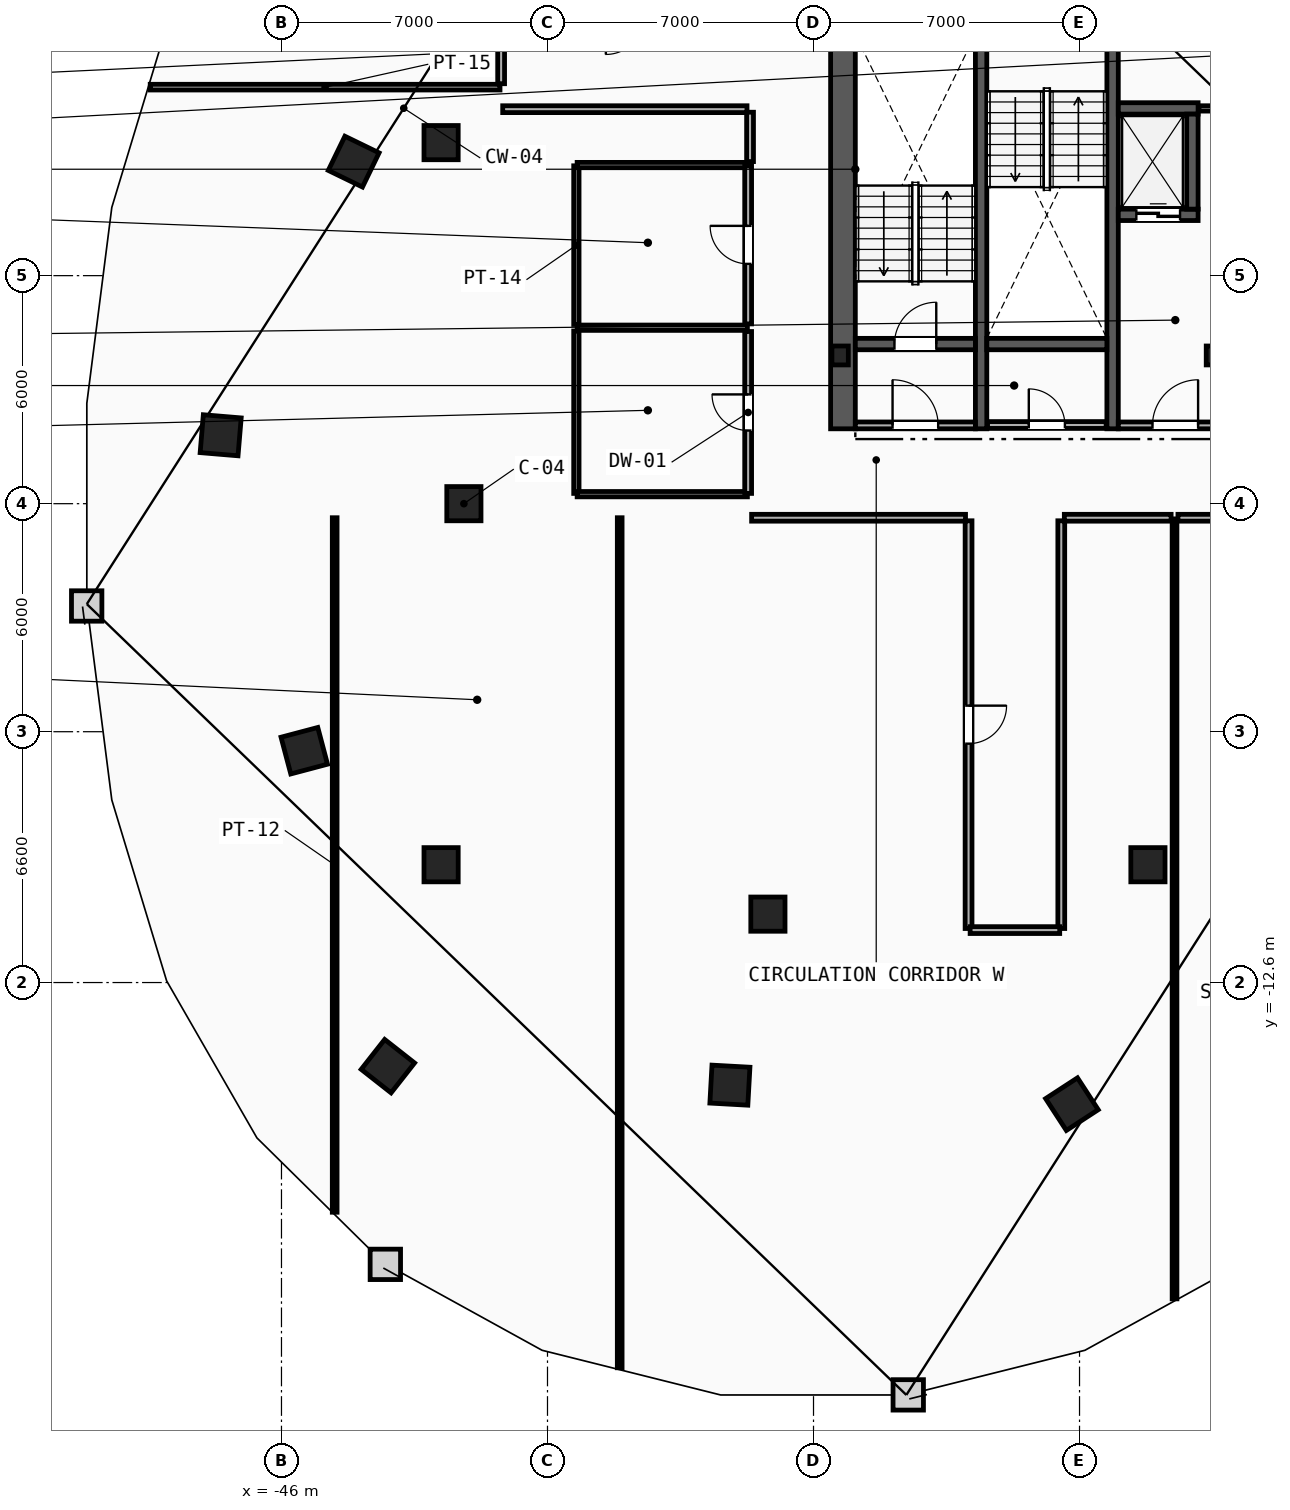
"""IFC4 building model, lengths in metres.
Left out: names, types, materials, properties, quantities, classifications, styles, units other than length and angle.
Written with IfcOpenShell. Run it as: python <this file> out.ifc"""

import sys

from ifc_helpers import new_model, si_unit, direction, frame, frame_2d, origin, origin_2d, place, context, subcontext, project, spatial, rectangle, i_section, extrude, element, fill, save


model = new_model("IFC4")
c1 = context("Model", 3, precision=1e-05, world=origin(), true_north=direction((0.0, 1.0)))
c2 = subcontext(c1, "Body", "Model", "MODEL_VIEW")
j1 = project(units=[si_unit("LENGTHUNIT", "METRE"), si_unit("PLANEANGLEUNIT", "RADIAN")], contexts=[c1])
p1 = place(None, origin())
s1 = spatial("IfcSite", under=j1, at=p1, CompositionType="ELEMENT")
p2 = place(p1, origin())
s2 = spatial("IfcBuilding", under=s1, at=p2, CompositionType="ELEMENT")
p3 = place(p2, frame((0.0, 0.0, 140.4)))
s3 = spatial("IfcBuildingStorey", under=s2, at=p3, CompositionType="ELEMENT", Elevation=140.4)
for number, where, z_axis, x_axis in (
    (1, (-31.3, 3.9, 0.0), (0.0, 0.0, 1.0), (1.0, 0.0, 0.0)),
    (2, (-21.45, 3.9, 0.0), (0.0, 0.0, 1.0), (1.0, 0.0, 0.0)),
):
    element("IfcColumn", number, at=place(p3, frame(where, z_axis=z_axis, x_axis=x_axis)), inside=s3, PredefinedType="COLUMN", context=c2, shape_type="SweptSolid", body=[
        extrude(i_section(OverallWidth=0.432, OverallDepth=0.498, WebThickness=0.056, FlangeThickness=0.089, FilletRadius=0.018, at=origin_2d()), origin(), (0.0, 0.0, 1.0), 3.6),
    ])
for number, where, z_axis, x_axis in (
    (3, (-41.2, 0.0, 0.0), (0.0, 0.0, 1.0), (1.0, 0.0, 0.0)),
    (4, (-41.8, 9.5, 0.0), (0.0, 0.0, 1.0), (1.0, 0.0, 0.0)),
    (5, (-41.8, -9.5, 0.0), (0.0, 0.0, 1.0), (1.0, 0.0, 0.0)),
    (6, (-33.2, -10.8, 0.0), (0.0, 0.0, 1.0), (1.0, 0.0, 0.0)),
    (7, (-23.2, -9.5, 0.0), (0.0, 0.0, 1.0), (1.0, 0.0, 0.0)),
):
    element("IfcColumn", number, at=place(p3, frame(where, z_axis=z_axis, x_axis=x_axis)), inside=s3, PredefinedType="COLUMN", context=c2, shape_type="SweptSolid", body=[
        extrude(rectangle(XDim=0.9, YDim=0.9, at=origin_2d()), origin(), (0.0, 0.0, 1.0), 3.6),
    ])
for number, where, z_axis, x_axis in (
    (8, (-44.1, 9.0, 0.0), (0.0, 0.0, 1.0), (-0.437, -0.899, 0.0)),
    (9, (-47.6, 1.8, 0.0), (0.0, 0.0, 1.0), (-0.084, -0.997, 0.0)),
    (10, (-45.4, -6.5, 0.0), (0.0, 0.0, 1.0), (0.256, -0.967, 0.0)),
    (11, (-43.2, -14.8, 0.0), (0.0, 0.0, 1.0), (0.786, -0.618, 0.0)),
    (12, (-34.2, -15.3, 0.0), (0.0, 0.0, 1.0), (0.998, -0.055, 0.0)),
    (13, (-25.2, -15.8, 0.0), (0.0, 0.0, 1.0), (0.838, 0.546, 0.0)),
):
    element("IfcColumn", number, at=place(p3, frame(where, z_axis=z_axis, x_axis=x_axis)), inside=s3, PredefinedType="COLUMN", context=c2, shape_type="SweptSolid", body=[
        extrude(rectangle(XDim=1.0, YDim=1.0, at=origin_2d()), origin(), (0.0, 0.0, 1.0), 3.6),
    ])
p4 = place(p3, frame((-31.225, 1.97, 0.0), z_axis=(0.0, 0.0, 1.0), x_axis=(0.0, 1.0, 0.0)))
e14 = element("IfcWall", 14, at=p4, inside=s3, PredefinedType="SHEAR", context=c2, shape_type="SweptSolid", body=[
    extrude(rectangle(XDim=13.33, YDim=0.65, at=frame_2d((6.665, 0.0))), origin(), (0.0, 0.0, 1.0), 3.36),
])
for number, where, z_axis, x_axis in (
    (15, (-27.59, 1.97, 0.0), (0.0, 0.0, 1.0), (0.0, 1.0, 0.0)),
    (16, (-24.13, 1.97, 0.0), (0.0, 0.0, 1.0), (0.0, 1.0, 0.0)),
):
    element("IfcWall", number, at=place(p3, frame(where, z_axis=z_axis, x_axis=x_axis)), inside=s3, PredefinedType="SHEAR", context=c2, shape_type="SweptSolid", body=[
        extrude(rectangle(XDim=10.68, YDim=0.3, at=frame_2d((5.34, 0.0))), origin(), (0.0, 0.0, 1.0), 3.36),
    ])
p5 = place(p3, frame((-30.9, 4.2, 0.0), z_axis=(0.0, 0.0, 1.0), x_axis=(1.0, 0.0, 0.0)))
e17 = element("IfcWall", 17, at=p5, inside=s3, PredefinedType="SHEAR", context=c2, shape_type="SweptSolid", body=[
    extrude(rectangle(XDim=3.16, YDim=0.3, at=frame_2d((1.58, 0.0))), origin(), (0.0, 0.0, 1.0), 3.36),
])
p6 = place(p5, frame((1.03, 0.0, 0.0)))
e18 = element("IfcOpeningElement", 18, at=p6, cuts=e17, PredefinedType="OPENING", context=c2, shape_type="SweptSolid", body=[
    extrude(rectangle(XDim=1.1, YDim=2.15, at=frame_2d((0.55, 1.075))), frame((0.0, 0.16, 0.0), z_axis=(0.0, -1.0, 0.0), x_axis=(1.0, 0.0, 0.0)), (0.0, 0.0, 1.0), 0.32),
])
p7 = place(p3, frame((-27.44, 4.2, 0.0), z_axis=(0.0, 0.0, 1.0), x_axis=(1.0, 0.0, 0.0)))
e19 = element("IfcWall", 19, at=p7, inside=s3, PredefinedType="SHEAR", context=c2, shape_type="SweptSolid", body=[
    extrude(rectangle(XDim=3.16, YDim=0.3, at=frame_2d((1.58, 0.0))), origin(), (0.0, 0.0, 1.0), 3.36),
])
p8 = place(p3, frame((-23.98, 2.06, 0.0), z_axis=(0.0, 0.0, 1.0), x_axis=(1.0, 0.0, 0.0)))
e20 = element("IfcWall", 20, at=p8, inside=s3, PredefinedType="PARTITIONING", context=c2, shape_type="SweptSolid", body=[
    extrude(rectangle(XDim=3.0, YDim=0.18, at=frame_2d((1.5, 0.0))), origin(), (0.0, 0.0, 1.0), 3.36),
])
p9 = place(p8, frame((0.9, 0.0, 0.0)))
e21 = element("IfcOpeningElement", 21, at=p9, cuts=e20, PredefinedType="OPENING", context=c2, shape_type="SweptSolid", body=[
    extrude(rectangle(XDim=1.2, YDim=2.15, at=frame_2d((0.6, 1.075))), frame((0.0, 0.1, 0.0), z_axis=(0.0, -1.0, 0.0), x_axis=(1.0, 0.0, 0.0)), (0.0, 0.0, 1.0), 0.2),
])
p10 = place(p3, frame((-30.9, 2.06, 0.0), z_axis=(0.0, 0.0, 1.0), x_axis=(1.0, 0.0, 0.0)))
e22 = element("IfcWall", 22, at=p10, inside=s3, PredefinedType="PARTITIONING", context=c2, shape_type="SweptSolid", body=[
    extrude(rectangle(XDim=3.16, YDim=0.18, at=frame_2d((1.58, 0.0))), origin(), (0.0, 0.0, 1.0), 3.36),
])
p11 = place(p10, frame((0.98, 0.0, 0.0)))
e23 = element("IfcOpeningElement", 23, at=p11, cuts=e22, PredefinedType="OPENING", context=c2, shape_type="SweptSolid", body=[
    extrude(rectangle(XDim=1.2, YDim=2.15, at=frame_2d((0.6, 1.075))), frame((0.0, 0.1, 0.0), z_axis=(0.0, -1.0, 0.0), x_axis=(1.0, 0.0, 0.0)), (0.0, 0.0, 1.0), 0.2),
])
p12 = place(p3, frame((-23.98, 7.6, 0.0), z_axis=(0.0, 0.0, 1.0), x_axis=(1.0, 0.0, 0.0)))
e24 = element("IfcWall", 24, at=p12, inside=s3, PredefinedType="SHEAR", context=c2, shape_type="SweptSolid", body=[
    extrude(rectangle(XDim=2.1, YDim=0.3, at=frame_2d((1.05, 0.0))), origin(), (0.0, 0.0, 1.0), 3.36),
])
p13 = place(p12, frame((0.475, 0.0, 0.0)))
e25 = element("IfcOpeningElement", 25, at=p13, cuts=e24, PredefinedType="OPENING", context=c2, shape_type="SweptSolid", body=[
    extrude(rectangle(XDim=1.15, YDim=2.2, at=frame_2d((0.575, 1.1))), frame((0.0, 0.16, 0.0), z_axis=(0.0, -1.0, 0.0), x_axis=(1.0, 0.0, 0.0)), (0.0, 0.0, 1.0), 0.32),
])
p14 = place(p3, frame((-23.98, 10.4, 0.0), z_axis=(0.0, 0.0, 1.0), x_axis=(1.0, 0.0, 0.0)))
e26 = element("IfcWall", 26, at=p14, inside=s3, PredefinedType="SHEAR", context=c2, shape_type="SweptSolid", body=[
    extrude(rectangle(XDim=2.1, YDim=0.3, at=frame_2d((1.05, 0.0))), origin(), (0.0, 0.0, 1.0), 3.36),
])
p15 = place(p3, frame((-22.03, 7.75, 0.0), z_axis=(0.0, 0.0, 1.0), x_axis=(0.0, 1.0, 0.0)))
e27 = element("IfcWall", 27, at=p15, inside=s3, PredefinedType="SHEAR", context=c2, shape_type="SweptSolid", body=[
    extrude(rectangle(XDim=2.5, YDim=0.3, at=frame_2d((1.25, 0.0))), origin(), (0.0, 0.0, 1.0), 3.36),
])
p16 = place(p3, frame((-21.86, 10.4, 0.0), z_axis=(0.0, 0.0, 1.0), x_axis=(1.0, 0.0, 0.0)))
e28 = element("IfcWall", 28, at=p16, inside=s3, PredefinedType="PARTITIONING", context=c2, shape_type="SweptSolid", body=[
    extrude(rectangle(XDim=0.59, YDim=0.14, at=frame_2d((0.295, 0.0))), origin(), (0.0, 0.0, 1.0), 3.36),
])
p17 = place(p3, frame((-27.42, 2.07, 0.0), z_axis=(0.0, 0.0, 1.0), x_axis=(1.0, 0.0, 0.0)))
e29 = element("IfcWall", 29, at=p17, inside=s3, PredefinedType="PARTITIONING", context=c2, shape_type="SweptSolid", body=[
    extrude(rectangle(XDim=3.12, YDim=0.18, at=frame_2d((1.56, 0.0))), origin(), (0.0, 0.0, 1.0), 3.36),
])
p18 = place(p17, frame((1.085, 0.0, 0.0)))
e30 = element("IfcOpeningElement", 30, at=p18, cuts=e29, PredefinedType="OPENING", context=c2, shape_type="SweptSolid", body=[
    extrude(rectangle(XDim=0.95, YDim=2.1, at=frame_2d((0.475, 1.05))), frame((0.0, 0.1, 0.0), z_axis=(0.0, -1.0, 0.0), x_axis=(1.0, 0.0, 0.0)), (0.0, 0.0, 1.0), 0.2),
])
p19 = place(p3, frame((-38.24, 0.27, 0.0), z_axis=(0.0, 0.0, 1.0), x_axis=(0.0, 1.0, 0.0)))
e31 = element("IfcWall", 31, at=p19, inside=s3, PredefinedType="PARTITIONING", context=c2, shape_type="SweptSolid", body=[
    extrude(rectangle(XDim=4.275, YDim=0.14, at=frame_2d((2.137, 0.0))), origin(), (0.0, 0.0, 1.0), 3.36),
])
p20 = place(p3, frame((-38.24, 4.715, 0.0), z_axis=(0.0, 0.0, 1.0), x_axis=(0.0, 1.0, 0.0)))
e32 = element("IfcWall", 32, at=p20, inside=s3, PredefinedType="PARTITIONING", context=c2, shape_type="SweptSolid", body=[
    extrude(rectangle(XDim=4.175, YDim=0.14, at=frame_2d((2.087, 0.0))), origin(), (0.0, 0.0, 1.0), 3.36),
])
for number, where, z_axis, x_axis in (
    (33, (-38.22, 0.25, 0.0), (0.0, 0.0, 1.0), (1.0, 0.0, 0.0)),
    (34, (-38.22, 4.63, 0.0), (0.0, 0.0, 1.0), (1.0, 0.0, 0.0)),
    (35, (-38.22, 8.91, 0.0), (0.0, 0.0, 1.0), (1.0, 0.0, 0.0)),
):
    element("IfcWall", number, at=place(p3, frame(where, z_axis=z_axis, x_axis=x_axis)), inside=s3, PredefinedType="PARTITIONING", context=c2, shape_type="SweptSolid", body=[
        extrude(rectangle(XDim=4.48, YDim=0.14, at=frame_2d((2.24, 0.0))), origin(), (0.0, 0.0, 1.0), 3.36),
    ])
p21 = place(p3, frame((-33.72, 0.27, 0.0), z_axis=(0.0, 0.0, 1.0), x_axis=(0.0, 1.0, 0.0)))
e36 = element("IfcWall", 36, at=p21, inside=s3, PredefinedType="PARTITIONING", context=c2, shape_type="SweptSolid", body=[
    extrude(rectangle(XDim=4.26, YDim=0.18, at=frame_2d((2.13, 0.0))), origin(), (0.0, 0.0, 1.0), 3.36),
])
p22 = place(p21, frame((1.655, 0.0, 0.0)))
e37 = element("IfcOpeningElement", 37, at=p22, cuts=e36, PredefinedType="OPENING", context=c2, shape_type="SweptSolid", body=[
    extrude(rectangle(XDim=0.95, YDim=2.1, at=frame_2d((0.475, 1.05))), frame((0.0, 0.1, 0.0), z_axis=(0.0, -1.0, 0.0), x_axis=(1.0, 0.0, 0.0)), (0.0, 0.0, 1.0), 0.2),
])
p23 = place(p3, frame((-33.72, 4.73, 0.0), z_axis=(0.0, 0.0, 1.0), x_axis=(0.0, 1.0, 0.0)))
e38 = element("IfcWall", 38, at=p23, inside=s3, PredefinedType="PARTITIONING", context=c2, shape_type="SweptSolid", body=[
    extrude(rectangle(XDim=4.16, YDim=0.18, at=frame_2d((2.08, 0.0))), origin(), (0.0, 0.0, 1.0), 3.36),
])
p24 = place(p23, frame((1.58, 0.0, 0.0)))
e39 = element("IfcOpeningElement", 39, at=p24, cuts=e38, PredefinedType="OPENING", context=c2, shape_type="SweptSolid", body=[
    extrude(rectangle(XDim=1.0, YDim=2.15, at=frame_2d((0.5, 1.075))), frame((0.0, 0.1, 0.0), z_axis=(0.0, -1.0, 0.0), x_axis=(1.0, 0.0, 0.0)), (0.0, 0.0, 1.0), 0.2),
])
p25 = place(p3, frame((-44.6, -18.644, 0.0), z_axis=(0.0, 0.0, 1.0), x_axis=(0.0, 1.0, 0.0)))
e40 = element("IfcWall", 40, at=p25, inside=s3, PredefinedType="PARTITIONING", context=c2, shape_type="SweptSolid", body=[
    extrude(rectangle(XDim=18.274, YDim=0.125, at=frame_2d((9.137, 0.0))), origin(), (0.0, 0.0, 1.0), 2.665),
])
p26 = place(p3, frame((-37.1, -22.736, 0.0), z_axis=(0.0, 0.0, 1.0), x_axis=(0.0, 1.0, 0.0)))
e41 = element("IfcWall", 41, at=p26, inside=s3, PredefinedType="PARTITIONING", context=c2, shape_type="SweptSolid", body=[
    extrude(rectangle(XDim=22.366, YDim=0.125, at=frame_2d((11.183, 0.0))), origin(), (0.0, 0.0, 1.0), 3.36),
])
p27 = place(p3, frame((-22.5, -20.923, 0.0), z_axis=(0.0, 0.0, 1.0), x_axis=(0.0, 1.0, 0.0)))
e42 = element("IfcWall", 42, at=p27, inside=s3, PredefinedType="PARTITIONING", context=c2, shape_type="SweptSolid", body=[
    extrude(rectangle(XDim=20.523, YDim=0.125, at=frame_2d((10.262, 0.0))), origin(), (0.0, 0.0, 1.0), 2.665),
])
p28 = place(p3, frame((-49.454, 10.96, 0.0), z_axis=(0.0, 0.0, 1.0), x_axis=(1.0, 0.0, 0.0)))
e43 = element("IfcWall", 43, at=p28, inside=s3, PredefinedType="PARTITIONING", context=c2, shape_type="SweptSolid", body=[
    extrude(rectangle(XDim=9.204, YDim=0.15, at=frame_2d((4.602, 0.0))), origin(), (0.0, 0.0, 1.0), 3.36),
])
p29 = place(p3, frame((-27.92, -0.45, 0.0), z_axis=(0.0, 0.0, 1.0), x_axis=(0.0, -1.0, 0.0)))
e44 = element("IfcWall", 44, at=p29, inside=s3, PredefinedType="PARTITIONING", context=c2, shape_type="SweptSolid", body=[
    extrude(rectangle(XDim=10.729, YDim=0.18, at=frame_2d((5.364, 0.0))), origin(), (0.0, 0.0, 1.0), 3.36),
])
p30 = place(p29, frame((4.864, 0.0, 0.0)))
e45 = element("IfcOpeningElement", 45, at=p30, cuts=e44, PredefinedType="OPENING", context=c2, shape_type="SweptSolid", body=[
    extrude(rectangle(XDim=1.0, YDim=2.15, at=frame_2d((0.5, 1.075))), frame((0.0, 0.1, 0.0), z_axis=(0.0, -1.0, 0.0), x_axis=(1.0, 0.0, 0.0)), (0.0, 0.0, 1.0), 0.2),
])
p31 = place(p3, frame((-25.48, -11.178, 0.0), z_axis=(0.0, 0.0, 1.0), x_axis=(0.0, 1.0, 0.0)))
e46 = element("IfcWall", 46, at=p31, inside=s3, PredefinedType="PARTITIONING", context=c2, shape_type="SweptSolid", body=[
    extrude(rectangle(XDim=10.729, YDim=0.18, at=frame_2d((5.364, 0.0))), origin(), (0.0, 0.0, 1.0), 3.36),
])
p32 = place(p3, frame((-40.178, 10.38, 0.0), z_axis=(0.0, 0.0, 1.0), x_axis=(1.0, 0.0, 0.0)))
e47 = element("IfcWall", 47, at=p32, inside=s3, PredefinedType="PARTITIONING", context=c2, shape_type="SweptSolid", body=[
    extrude(rectangle(XDim=6.428, YDim=0.18, at=frame_2d((3.214, 0.0))), origin(), (0.0, 0.0, 1.0), 3.36),
])
p33 = place(p3, frame((-33.628, -0.37, 0.0), z_axis=(0.0, 0.0, 1.0), x_axis=(1.0, 0.0, 0.0)))
e48 = element("IfcWall", 48, at=p33, inside=s3, PredefinedType="PARTITIONING", context=c2, shape_type="SweptSolid", body=[
    extrude(rectangle(XDim=5.628, YDim=0.18, at=frame_2d((2.814, 0.0))), origin(), (0.0, 0.0, 1.0), 3.36),
])
p34 = place(p3, frame((-25.4, -0.37, 0.0), z_axis=(0.0, 0.0, 1.0), x_axis=(1.0, 0.0, 0.0)))
e49 = element("IfcWall", 49, at=p34, inside=s3, PredefinedType="PARTITIONING", context=c2, shape_type="SweptSolid", body=[
    extrude(rectangle(XDim=2.81, YDim=0.18, at=frame_2d((1.405, 0.0))), origin(), (0.0, 0.0, 1.0), 3.36),
])
p35 = place(p3, frame((-27.878, -11.22, 0.0), z_axis=(0.0, 0.0, 1.0), x_axis=(1.0, 0.0, 0.0)))
e50 = element("IfcWall", 50, at=p35, inside=s3, PredefinedType="PARTITIONING", context=c2, shape_type="SweptSolid", body=[
    extrude(rectangle(XDim=2.357, YDim=0.18, at=frame_2d((1.178, 0.0))), origin(), (0.0, 0.0, 1.0), 3.36),
])
p36 = place(p3, frame((-33.67, 10.3, 0.0), z_axis=(0.0, 0.0, 1.0), x_axis=(0.0, -1.0, 0.0)))
e51 = element("IfcWall", 51, at=p36, inside=s3, PredefinedType="PARTITIONING", context=c2, shape_type="SweptSolid", body=[
    extrude(rectangle(XDim=1.299, YDim=0.18, at=frame_2d((0.649, 0.0))), origin(), (0.0, 0.0, 1.0), 3.36),
])
p37 = place(p3, frame((-22.41, -0.37, 0.0), z_axis=(0.0, 0.0, 1.0), x_axis=(1.0, 0.0, 0.0)))
e52 = element("IfcWall", 52, at=p37, inside=s3, PredefinedType="PARTITIONING", context=c2, shape_type="SweptSolid", body=[
    extrude(rectangle(XDim=5.588, YDim=0.18, at=frame_2d((2.794, 0.0))), origin(), (0.0, 0.0, 1.0), 3.36),
])
p38 = place(p37, frame((2.294, 0.0, 0.0)))
e53 = element("IfcOpeningElement", 53, at=p38, cuts=e52, PredefinedType="OPENING", context=c2, shape_type="SweptSolid", body=[
    extrude(rectangle(XDim=1.0, YDim=2.15, at=frame_2d((0.5, 1.075))), frame((0.0, 0.1, 0.0), z_axis=(0.0, -1.0, 0.0), x_axis=(1.0, 0.0, 0.0)), (0.0, 0.0, 1.0), 0.2),
])
p39 = place(p3, frame((-40.22, 12.779, 0.0), z_axis=(0.0, 0.0, 1.0), x_axis=(0.0, -1.0, 0.0)))
e54 = element("IfcWall", 54, at=p39, inside=s3, PredefinedType="PARTITIONING", context=c2, shape_type="SweptSolid", body=[
    extrude(rectangle(XDim=1.729, YDim=0.18, at=frame_2d((0.864, 0.0))), origin(), (0.0, 0.0, 1.0), 3.36),
])
p40 = place(p6, origin())
e55 = element("IfcDoor", 55, at=p40, inside=s3, OperationType="SINGLE_SWING_RIGHT", PredefinedType="DOOR", context=c2, shape_type="SweptSolid", body=[
    extrude(rectangle(XDim=1.1, YDim=2.15, at=frame_2d((0.55, 1.075))), frame((0.0, 0.025, 0.0), z_axis=(0.0, -1.0, 0.0), x_axis=(1.0, 0.0, 0.0)), (0.0, 0.0, 1.0), 0.05),
])
fill(e18, e55)
p41 = place(p9, origin())
e56 = element("IfcDoor", 56, at=p41, inside=s3, OperationType="SINGLE_SWING_RIGHT", PredefinedType="DOOR", context=c2, shape_type="SweptSolid", body=[
    extrude(rectangle(XDim=1.2, YDim=2.15, at=frame_2d((0.6, 1.075))), frame((0.0, 0.025, 0.0), z_axis=(0.0, -1.0, 0.0), x_axis=(1.0, 0.0, 0.0)), (0.0, 0.0, 1.0), 0.05),
])
fill(e21, e56)
p42 = place(p11, origin())
e57 = element("IfcDoor", 57, at=p42, inside=s3, OperationType="SINGLE_SWING_LEFT", PredefinedType="DOOR", context=c2, shape_type="SweptSolid", body=[
    extrude(rectangle(XDim=1.2, YDim=2.15, at=frame_2d((0.6, 1.075))), frame((0.0, 0.025, 0.0), z_axis=(0.0, -1.0, 0.0), x_axis=(1.0, 0.0, 0.0)), (0.0, 0.0, 1.0), 0.05),
])
fill(e23, e57)
p43 = place(p13, origin())
e58 = element("IfcDoor", 58, at=p43, inside=s3, OperationType="SLIDING_TO_LEFT", PredefinedType="TRAPDOOR", context=c2, shape_type="SweptSolid", body=[
    extrude(rectangle(XDim=1.15, YDim=2.2, at=frame_2d((0.575, 1.1))), frame((0.0, 0.025, 0.0), z_axis=(0.0, -1.0, 0.0), x_axis=(1.0, 0.0, 0.0)), (0.0, 0.0, 1.0), 0.05),
])
fill(e25, e58)
p44 = place(p30, origin())
e59 = element("IfcDoor", 59, at=p44, inside=s3, OperationType="SINGLE_SWING_LEFT", PredefinedType="DOOR", context=c2, shape_type="SweptSolid", body=[
    extrude(rectangle(XDim=1.0, YDim=2.15, at=frame_2d((0.5, 1.075))), frame((0.0, 0.025, 0.0), z_axis=(0.0, -1.0, 0.0), x_axis=(1.0, 0.0, 0.0)), (0.0, 0.0, 1.0), 0.05),
])
fill(e45, e59)
p45 = place(p22, origin())
e60 = element("IfcDoor", 60, at=p45, inside=s3, OperationType="SINGLE_SWING_RIGHT", PredefinedType="DOOR", context=c2, shape_type="SweptSolid", body=[
    extrude(rectangle(XDim=0.95, YDim=2.1, at=frame_2d((0.475, 1.05))), frame((0.0, 0.025, 0.0), z_axis=(0.0, -1.0, 0.0), x_axis=(1.0, 0.0, 0.0)), (0.0, 0.0, 1.0), 0.05),
])
fill(e37, e60)
p46 = place(p24, origin())
e61 = element("IfcDoor", 61, at=p46, inside=s3, OperationType="SINGLE_SWING_RIGHT", PredefinedType="DOOR", context=c2, shape_type="SweptSolid", body=[
    extrude(rectangle(XDim=1.0, YDim=2.15, at=frame_2d((0.5, 1.075))), frame((0.0, 0.025, 0.0), z_axis=(0.0, -1.0, 0.0), x_axis=(1.0, 0.0, 0.0)), (0.0, 0.0, 1.0), 0.05),
])
fill(e39, e61)
p47 = place(p18, origin())
e62 = element("IfcDoor", 62, at=p47, inside=s3, OperationType="SINGLE_SWING_LEFT", PredefinedType="DOOR", context=c2, shape_type="SweptSolid", body=[
    extrude(rectangle(XDim=0.95, YDim=2.1, at=frame_2d((0.475, 1.05))), frame((0.0, 0.025, 0.0), z_axis=(0.0, -1.0, 0.0), x_axis=(1.0, 0.0, 0.0)), (0.0, 0.0, 1.0), 0.05),
])
fill(e30, e62)
save(model, sys.argv[1])
